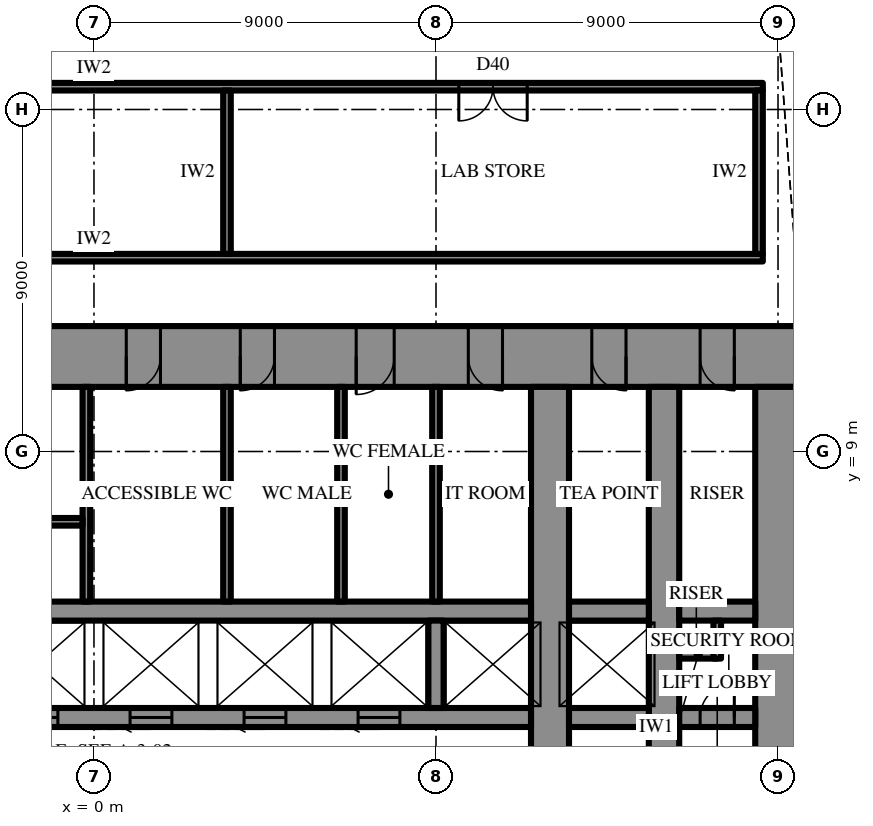
"""IFC4 building model, lengths in metres.
Left out: names, types, materials, properties, quantities, classifications, styles, units other than length and angle.
Written with IfcOpenShell. Run it as: python <this file> out.ifc"""

import sys

from ifc_helpers import new_model, si_unit, direction, frame, frame_2d, origin, place, context, subcontext, project, spatial, rectangle, extrude, element, fill, save


model = new_model("IFC4")
c1 = context("Model", 3, precision=1e-05, world=origin(), true_north=direction((0.0, 1.0)))
c2 = subcontext(c1, "Body", "Model", "MODEL_VIEW")
j1 = project(units=[si_unit("LENGTHUNIT", "METRE"), si_unit("PLANEANGLEUNIT", "RADIAN")], contexts=[c1])
p1 = place(None, origin())
s1 = spatial("IfcSite", under=j1, at=p1, CompositionType="ELEMENT")
p2 = place(p1, origin())
s2 = spatial("IfcBuilding", under=s1, at=p2, CompositionType="ELEMENT")
p3 = place(p2, frame((0.0, 0.0, 199.3)))
s3 = spatial("IfcBuildingStorey", under=s2, at=p3, CompositionType="ELEMENT", Elevation=199.3)
p4 = place(p3, frame((-18.6, 11.5, 0.0), z_axis=(0.0, 0.0, 1.0), x_axis=(1.0, 0.0, 0.0)))
e1 = element("IfcWall", 1, at=p4, inside=s3, PredefinedType="SHEAR", context=c2, shape_type="SweptSolid", body=[
    extrude(rectangle(XDim=37.2, YDim=1.6, at=frame_2d((18.6, 0.0))), origin(), (0.0, 0.0, 1.0), 4.2),
])
p5 = place(p4, frame((19.45, 0.0, 0.0)))
e2 = element("IfcOpeningElement", 2, at=p5, cuts=e1, PredefinedType="OPENING", context=c2, shape_type="SweptSolid", body=[
    extrude(rectangle(XDim=0.9, YDim=2.2, at=frame_2d((0.45, 1.1))), frame((0.0, 0.81, 0.0), z_axis=(0.0, -1.0, 0.0), x_axis=(1.0, 0.0, 0.0)), (0.0, 0.0, 1.0), 1.62),
])
p6 = place(p4, frame((22.45, 0.0, 0.0)))
e3 = element("IfcOpeningElement", 3, at=p6, cuts=e1, PredefinedType="OPENING", context=c2, shape_type="SweptSolid", body=[
    extrude(rectangle(XDim=0.9, YDim=2.2, at=frame_2d((0.45, 1.1))), frame((0.0, 0.81, 0.0), z_axis=(0.0, -1.0, 0.0), x_axis=(1.0, 0.0, 0.0)), (0.0, 0.0, 1.0), 1.62),
])
p7 = place(p4, frame((25.5, 0.0, 0.0)))
e4 = element("IfcOpeningElement", 4, at=p7, cuts=e1, PredefinedType="OPENING", context=c2, shape_type="SweptSolid", body=[
    extrude(rectangle(XDim=1.0, YDim=2.2, at=frame_2d((0.5, 1.1))), frame((0.0, 0.81, 0.0), z_axis=(0.0, -1.0, 0.0), x_axis=(1.0, 0.0, 0.0)), (0.0, 0.0, 1.0), 1.62),
])
p8 = place(p4, frame((1.75, 0.0, 0.0)))
e5 = element("IfcOpeningElement", 5, at=p8, cuts=e1, PredefinedType="OPENING", context=c2, shape_type="SweptSolid", body=[
    extrude(rectangle(XDim=0.9, YDim=2.2, at=frame_2d((0.45, 1.1))), frame((0.0, 0.81, 0.0), z_axis=(0.0, -1.0, 0.0), x_axis=(1.0, 0.0, 0.0)), (0.0, 0.0, 1.0), 1.62),
])
p9 = place(p4, frame((4.6, 0.0, 0.0)))
e6 = element("IfcOpeningElement", 6, at=p9, cuts=e1, PredefinedType="OPENING", context=c2, shape_type="SweptSolid", body=[
    extrude(rectangle(XDim=0.9, YDim=2.2, at=frame_2d((0.45, 1.1))), frame((0.0, 0.81, 0.0), z_axis=(0.0, -1.0, 0.0), x_axis=(1.0, 0.0, 0.0)), (0.0, 0.0, 1.0), 1.62),
])
p10 = place(p4, frame((7.85, 0.0, 0.0)))
e7 = element("IfcOpeningElement", 7, at=p10, cuts=e1, PredefinedType="OPENING", context=c2, shape_type="SweptSolid", body=[
    extrude(rectangle(XDim=0.9, YDim=2.2, at=frame_2d((0.45, 1.1))), frame((0.0, 0.81, 0.0), z_axis=(0.0, -1.0, 0.0), x_axis=(1.0, 0.0, 0.0)), (0.0, 0.0, 1.0), 1.62),
])
p11 = place(p4, frame((28.45, 0.0, 0.0)))
e8 = element("IfcOpeningElement", 8, at=p11, cuts=e1, PredefinedType="OPENING", context=c2, shape_type="SweptSolid", body=[
    extrude(rectangle(XDim=0.9, YDim=2.2, at=frame_2d((0.45, 1.1))), frame((0.0, 0.81, 0.0), z_axis=(0.0, -1.0, 0.0), x_axis=(1.0, 0.0, 0.0)), (0.0, 0.0, 1.0), 1.62),
])
p12 = place(p4, frame((31.7, 0.0, 0.0)))
e9 = element("IfcOpeningElement", 9, at=p12, cuts=e1, PredefinedType="OPENING", context=c2, shape_type="SweptSolid", body=[
    extrude(rectangle(XDim=0.9, YDim=2.2, at=frame_2d((0.45, 1.1))), frame((0.0, 0.81, 0.0), z_axis=(0.0, -1.0, 0.0), x_axis=(1.0, 0.0, 0.0)), (0.0, 0.0, 1.0), 1.62),
])
p13 = place(p4, frame((34.55, 0.0, 0.0)))
e10 = element("IfcOpeningElement", 10, at=p13, cuts=e1, PredefinedType="OPENING", context=c2, shape_type="SweptSolid", body=[
    extrude(rectangle(XDim=0.9, YDim=2.2, at=frame_2d((0.45, 1.1))), frame((0.0, 0.81, 0.0), z_axis=(0.0, -1.0, 0.0), x_axis=(1.0, 0.0, 0.0)), (0.0, 0.0, 1.0), 1.62),
])
p14 = place(p3, frame((18.0, -10.7, 0.0), z_axis=(0.0, 0.0, 1.0), x_axis=(0.0, 1.0, 0.0)))
e11 = element("IfcWall", 11, at=p14, inside=s3, PredefinedType="SHEAR", context=c2, shape_type="SweptSolid", body=[
    extrude(rectangle(XDim=21.4, YDim=1.2, at=frame_2d((10.7, 0.0))), origin(), (0.0, 0.0, 1.0), 4.2),
])
p15 = place(p14, frame((9.8, 0.0, 0.0)))
e12 = element("IfcOpeningElement", 12, at=p15, cuts=e11, PredefinedType="OPENING", context=c2, shape_type="SweptSolid", body=[
    extrude(rectangle(XDim=1.8, YDim=2.4, at=frame_2d((0.9, 1.2))), frame((0.0, 0.61, 0.0), z_axis=(0.0, -1.0, 0.0), x_axis=(1.0, 0.0, 0.0)), (0.0, 0.0, 1.0), 1.22),
])
p16 = place(p3, frame((12.0, -10.7, 0.0), z_axis=(0.0, 0.0, 1.0), x_axis=(0.0, 1.0, 0.0)))
e13 = element("IfcWall", 13, at=p16, inside=s3, PredefinedType="SHEAR", context=c2, shape_type="SweptSolid", body=[
    extrude(rectangle(XDim=21.4, YDim=1.0, at=frame_2d((10.7, 0.0))), origin(), (0.0, 0.0, 1.0), 4.2),
])
p17 = place(p16, frame((9.8, 0.0, 0.0)))
e14 = element("IfcOpeningElement", 14, at=p17, cuts=e13, PredefinedType="OPENING", context=c2, shape_type="SweptSolid", body=[
    extrude(rectangle(XDim=1.8, YDim=2.4, at=frame_2d((0.9, 1.2))), frame((0.0, 0.51, 0.0), z_axis=(0.0, -1.0, 0.0), x_axis=(1.0, 0.0, 0.0)), (0.0, 0.0, 1.0), 1.02),
])
p18 = place(p3, frame((15.0, -10.7, 0.0), z_axis=(0.0, 0.0, 1.0), x_axis=(0.0, 1.0, 0.0)))
e15 = element("IfcWall", 15, at=p18, inside=s3, PredefinedType="SHEAR", context=c2, shape_type="SweptSolid", body=[
    extrude(rectangle(XDim=21.4, YDim=0.8, at=frame_2d((10.7, 0.0))), origin(), (0.0, 0.0, 1.0), 4.2),
])
p19 = place(p18, frame((9.8, 0.0, 0.0)))
e16 = element("IfcOpeningElement", 16, at=p19, cuts=e15, PredefinedType="OPENING", context=c2, shape_type="SweptSolid", body=[
    extrude(rectangle(XDim=1.8, YDim=2.4, at=frame_2d((0.9, 1.2))), frame((0.0, 0.41, 0.0), z_axis=(0.0, -1.0, 0.0), x_axis=(1.0, 0.0, 0.0)), (0.0, 0.0, 1.0), 0.82),
])
p20 = place(p3, frame((-3.2, 2.0, 0.0), z_axis=(0.0, 0.0, 1.0), x_axis=(1.0, 0.0, 0.0)))
e17 = element("IfcWall", 17, at=p20, inside=s3, PredefinedType="SHEAR", context=c2, shape_type="SweptSolid", body=[
    extrude(rectangle(XDim=14.7, YDim=0.5, at=frame_2d((7.35, 0.0))), origin(), (0.0, 0.0, 1.0), 4.2),
])
p21 = place(p20, frame((1.15, 0.0, 0.0)))
e18 = element("IfcOpeningElement", 18, at=p21, cuts=e17, PredefinedType="OPENING", context=c2, shape_type="SweptSolid", body=[
    extrude(rectangle(XDim=1.1, YDim=2.2, at=frame_2d((0.55, 1.1))), frame((0.0, 0.26, 0.0), z_axis=(0.0, -1.0, 0.0), x_axis=(1.0, 0.0, 0.0)), (0.0, 0.0, 1.0), 0.52),
])
p22 = place(p20, frame((4.15, 0.0, 0.0)))
e19 = element("IfcOpeningElement", 19, at=p22, cuts=e17, PredefinedType="OPENING", context=c2, shape_type="SweptSolid", body=[
    extrude(rectangle(XDim=1.1, YDim=2.2, at=frame_2d((0.55, 1.1))), frame((0.0, 0.26, 0.0), z_axis=(0.0, -1.0, 0.0), x_axis=(1.0, 0.0, 0.0)), (0.0, 0.0, 1.0), 0.52),
])
p23 = place(p20, frame((7.15, 0.0, 0.0)))
e20 = element("IfcOpeningElement", 20, at=p23, cuts=e17, PredefinedType="OPENING", context=c2, shape_type="SweptSolid", body=[
    extrude(rectangle(XDim=1.1, YDim=2.2, at=frame_2d((0.55, 1.1))), frame((0.0, 0.26, 0.0), z_axis=(0.0, -1.0, 0.0), x_axis=(1.0, 0.0, 0.0)), (0.0, 0.0, 1.0), 0.52),
])
p24 = place(p20, frame((10.15, 0.0, 0.0)))
e21 = element("IfcOpeningElement", 21, at=p24, cuts=e17, PredefinedType="OPENING", context=c2, shape_type="SweptSolid", body=[
    extrude(rectangle(XDim=1.1, YDim=2.2, at=frame_2d((0.55, 1.1))), frame((0.0, 0.26, 0.0), z_axis=(0.0, -1.0, 0.0), x_axis=(1.0, 0.0, 0.0)), (0.0, 0.0, 1.0), 0.52),
])
p25 = place(p3, frame((12.5, 2.0, 0.0), z_axis=(0.0, 0.0, 1.0), x_axis=(1.0, 0.0, 0.0)))
e22 = element("IfcWall", 22, at=p25, inside=s3, PredefinedType="SHEAR", context=c2, shape_type="SweptSolid", body=[
    extrude(rectangle(XDim=2.1, YDim=0.5, at=frame_2d((1.05, 0.0))), origin(), (0.0, 0.0, 1.0), 4.2),
])
p26 = place(p3, frame((15.4, 2.0, 0.0), z_axis=(0.0, 0.0, 1.0), x_axis=(1.0, 0.0, 0.0)))
e23 = element("IfcWall", 23, at=p26, inside=s3, PredefinedType="SHEAR", context=c2, shape_type="SweptSolid", body=[
    extrude(rectangle(XDim=2.0, YDim=0.5, at=frame_2d((1.0, 0.0))), origin(), (0.0, 0.0, 1.0), 4.2),
])
p27 = place(p26, frame((0.55, 0.0, 0.0)))
e24 = element("IfcOpeningElement", 24, at=p27, cuts=e23, PredefinedType="OPENING", context=c2, shape_type="SweptSolid", body=[
    extrude(rectangle(XDim=0.9, YDim=2.2, at=frame_2d((0.45, 1.1))), frame((0.0, 0.26, 0.0), z_axis=(0.0, -1.0, 0.0), x_axis=(1.0, 0.0, 0.0)), (0.0, 0.0, 1.0), 0.52),
])
p28 = place(p3, frame((-11.5, 4.8, 0.0), z_axis=(0.0, 0.0, 1.0), x_axis=(1.0, 0.0, 0.0)))
e25 = element("IfcWall", 25, at=p28, inside=s3, PredefinedType="SHEAR", context=c2, shape_type="SweptSolid", body=[
    extrude(rectangle(XDim=23.0, YDim=0.5, at=frame_2d((11.5, 0.0))), origin(), (0.0, 0.0, 1.0), 4.2),
])
p29 = place(p28, frame((6.4, 0.0, 0.0)))
e26 = element("IfcOpeningElement", 26, at=p29, cuts=e25, PredefinedType="OPENING", context=c2, shape_type="SweptSolid", body=[
    extrude(rectangle(XDim=1.2, YDim=2.2, at=frame_2d((0.6, 1.1))), frame((0.0, 0.26, 0.0), z_axis=(0.0, -1.0, 0.0), x_axis=(1.0, 0.0, 0.0)), (0.0, 0.0, 1.0), 0.52),
])
p30 = place(p28, frame((3.4, 0.0, 0.0)))
e27 = element("IfcOpeningElement", 27, at=p30, cuts=e25, PredefinedType="OPENING", context=c2, shape_type="SweptSolid", body=[
    extrude(rectangle(XDim=1.2, YDim=2.2, at=frame_2d((0.6, 1.1))), frame((0.0, 0.26, 0.0), z_axis=(0.0, -1.0, 0.0), x_axis=(1.0, 0.0, 0.0)), (0.0, 0.0, 1.0), 0.52),
])
p31 = place(p3, frame((12.5, 4.8, 0.0), z_axis=(0.0, 0.0, 1.0), x_axis=(1.0, 0.0, 0.0)))
e28 = element("IfcWall", 28, at=p31, inside=s3, PredefinedType="SHEAR", context=c2, shape_type="SweptSolid", body=[
    extrude(rectangle(XDim=2.1, YDim=0.5, at=frame_2d((1.05, 0.0))), origin(), (0.0, 0.0, 1.0), 4.2),
])
p32 = place(p3, frame((15.4, 4.8, 0.0), z_axis=(0.0, 0.0, 1.0), x_axis=(1.0, 0.0, 0.0)))
e29 = element("IfcWall", 29, at=p32, inside=s3, PredefinedType="SHEAR", context=c2, shape_type="SweptSolid", body=[
    extrude(rectangle(XDim=2.0, YDim=0.5, at=frame_2d((1.0, 0.0))), origin(), (0.0, 0.0, 1.0), 4.2),
])
p33 = place(p3, frame((9.0, 2.25, 0.0), z_axis=(0.0, 0.0, 1.0), x_axis=(0.0, 1.0, 0.0)))
e30 = element("IfcWall", 30, at=p33, inside=s3, PredefinedType="SHEAR", context=c2, shape_type="SweptSolid", body=[
    extrude(rectangle(XDim=2.3, YDim=0.4, at=frame_2d((1.15, 0.0))), origin(), (0.0, 0.0, 1.0), 4.2),
])
p34 = place(p3, frame((-0.2, 5.05, 0.0), z_axis=(0.0, 0.0, 1.0), x_axis=(0.0, 1.0, 0.0)))
e31 = element("IfcWall", 31, at=p34, inside=s3, PredefinedType="SHEAR", context=c2, shape_type="SweptSolid", body=[
    extrude(rectangle(XDim=5.65, YDim=0.2, at=frame_2d((2.825, 0.0))), origin(), (0.0, 0.0, 1.0), 4.2),
])
p35 = place(p3, frame((-8.9, 7.15, 0.0), z_axis=(0.0, 0.0, 1.0), x_axis=(1.0, 0.0, 0.0)))
e32 = element("IfcWall", 32, at=p35, inside=s3, PredefinedType="SHEAR", context=c2, shape_type="SweptSolid", body=[
    extrude(rectangle(XDim=8.6, YDim=0.2, at=frame_2d((4.3, 0.0))), origin(), (0.0, 0.0, 1.0), 4.2),
])
p36 = place(p35, frame((0.3, 0.0, 0.0)))
e33 = element("IfcOpeningElement", 33, at=p36, cuts=e32, PredefinedType="OPENING", context=c2, shape_type="SweptSolid", body=[
    extrude(rectangle(XDim=1.0, YDim=2.2, at=frame_2d((0.5, 1.1))), frame((0.0, 0.11, 0.0), z_axis=(0.0, -1.0, 0.0), x_axis=(1.0, 0.0, 0.0)), (0.0, 0.0, 1.0), 0.22),
])
for number, where, z_axis, x_axis in (
    (34, (9.0, 5.05, 0.0), (0.0, 0.0, 1.0), (0.0, 1.0, 0.0)),
    (35, (3.5, 5.05, 0.0), (0.0, 0.0, 1.0), (0.0, 1.0, 0.0)),
    (36, (6.5, 5.05, 0.0), (0.0, 0.0, 1.0), (0.0, 1.0, 0.0)),
):
    element("IfcWall", number, at=place(p3, frame(where, z_axis=z_axis, x_axis=x_axis)), inside=s3, PredefinedType="PARTITIONING", context=c2, shape_type="SweptSolid", body=[
        extrude(rectangle(XDim=5.65, YDim=0.2, at=frame_2d((2.825, 0.0))), origin(), (0.0, 0.0, 1.0), 3.9),
    ])
for number, where, z_axis, x_axis in (
    (37, (15.4, 3.65, 0.0), (0.0, 0.0, 1.0), (1.0, 0.0, 0.0)),
    (38, (16.4, 3.55, 0.0), (0.0, 0.0, 1.0), (0.0, 1.0, 0.0)),
):
    element("IfcWall", number, at=place(p3, frame(where, z_axis=z_axis, x_axis=x_axis)), inside=s3, PredefinedType="PARTITIONING", context=c2, shape_type="SweptSolid", body=[
        extrude(rectangle(XDim=1.0, YDim=0.2, at=frame_2d((0.5, 0.0))), origin(), (0.0, 0.0, 1.0), 3.9),
    ])
p37 = place(p3, frame((-17.6, 14.1, 0.0), z_axis=(0.0, 0.0, 1.0), x_axis=(1.0, 0.0, 0.0)))
e39 = element("IfcWall", 39, at=p37, inside=s3, PredefinedType="PARTITIONING", context=c2, shape_type="SweptSolid", body=[
    extrude(rectangle(XDim=35.2, YDim=0.2, at=frame_2d((17.6, 0.0))), origin(), (0.0, 0.0, 1.0), 3.9),
])
p38 = place(p3, frame((-17.6, 18.6, 0.0), z_axis=(0.0, 0.0, 1.0), x_axis=(1.0, 0.0, 0.0)))
e40 = element("IfcWall", 40, at=p38, inside=s3, PredefinedType="PARTITIONING", context=c2, shape_type="SweptSolid", body=[
    extrude(rectangle(XDim=35.2, YDim=0.2, at=frame_2d((17.6, 0.0))), origin(), (0.0, 0.0, 1.0), 3.9),
])
p39 = place(p38, frame((9.7, 0.0, 0.0)))
e41 = element("IfcOpeningElement", 41, at=p39, cuts=e40, PredefinedType="OPENING", context=c2, shape_type="SweptSolid", body=[
    extrude(rectangle(XDim=1.8, YDim=2.4, at=frame_2d((0.9, 1.2))), frame((0.0, 0.11, 0.0), z_axis=(0.0, -1.0, 0.0), x_axis=(1.0, 0.0, 0.0)), (0.0, 0.0, 1.0), 0.22),
])
p40 = place(p38, frame((27.2, 0.0, 0.0)))
e42 = element("IfcOpeningElement", 42, at=p40, cuts=e40, PredefinedType="OPENING", context=c2, shape_type="SweptSolid", body=[
    extrude(rectangle(XDim=1.8, YDim=2.4, at=frame_2d((0.9, 1.2))), frame((0.0, 0.11, 0.0), z_axis=(0.0, -1.0, 0.0), x_axis=(1.0, 0.0, 0.0)), (0.0, 0.0, 1.0), 0.22),
])
for number, where, z_axis, x_axis in (
    (43, (3.5, 14.2, 0.0), (0.0, 0.0, 1.0), (0.0, 1.0, 0.0)),
    (44, (17.5, 14.2, 0.0), (0.0, 0.0, 1.0), (0.0, 1.0, 0.0)),
):
    element("IfcWall", number, at=place(p3, frame(where, z_axis=z_axis, x_axis=x_axis)), inside=s3, PredefinedType="PARTITIONING", context=c2, shape_type="SweptSolid", body=[
        extrude(rectangle(XDim=4.3, YDim=0.2, at=frame_2d((2.15, 0.0))), origin(), (0.0, 0.0, 1.0), 3.9),
    ])
p41 = place(p3, frame((28.436, 4.747, 0.0), z_axis=(0.0, 0.0, 1.0), x_axis=(-0.499995666571, 0.866027905677, 0.0)))
e45 = element("IfcWall", 45, at=p41, inside=s3, PredefinedType="PARTITIONING", context=c2, shape_type="SweptSolid", body=[
    extrude(rectangle(XDim=20.215, YDim=0.2, at=frame_2d((10.107, 0.0))), origin(), (0.0, 0.0, 1.0), 3.9),
])
p42 = place(p41, frame((2.102, 0.0, 0.0)))
e46 = element("IfcOpeningElement", 46, at=p42, cuts=e45, PredefinedType="OPENING", context=c2, shape_type="SweptSolid", body=[
    extrude(rectangle(XDim=1.0, YDim=2.2, at=frame_2d((0.5, 1.1))), frame((0.0, 0.11, 0.0), z_axis=(0.0, -1.0, 0.0), x_axis=(1.0, 0.0, 0.0)), (0.0, 0.0, 1.0), 0.22),
])
p43 = place(p41, frame((7.105, 0.0, 0.0)))
e47 = element("IfcOpeningElement", 47, at=p43, cuts=e45, PredefinedType="OPENING", context=c2, shape_type="SweptSolid", body=[
    extrude(rectangle(XDim=1.0, YDim=2.2, at=frame_2d((0.5, 1.1))), frame((0.0, 0.11, 0.0), z_axis=(0.0, -1.0, 0.0), x_axis=(1.0, 0.0, 0.0)), (0.0, 0.0, 1.0), 0.22),
])
p44 = place(p41, frame((12.109, 0.0, 0.0)))
e48 = element("IfcOpeningElement", 48, at=p44, cuts=e45, PredefinedType="OPENING", context=c2, shape_type="SweptSolid", body=[
    extrude(rectangle(XDim=1.0, YDim=2.2, at=frame_2d((0.5, 1.1))), frame((0.0, 0.11, 0.0), z_axis=(0.0, -1.0, 0.0), x_axis=(1.0, 0.0, 0.0)), (0.0, 0.0, 1.0), 0.22),
])
p45 = place(p41, frame((17.113, 0.0, 0.0)))
e49 = element("IfcOpeningElement", 49, at=p45, cuts=e45, PredefinedType="OPENING", context=c2, shape_type="SweptSolid", body=[
    extrude(rectangle(XDim=1.0, YDim=2.2, at=frame_2d((0.5, 1.1))), frame((0.0, 0.11, 0.0), z_axis=(0.0, -1.0, 0.0), x_axis=(1.0, 0.0, 0.0)), (0.0, 0.0, 1.0), 0.22),
])
p46 = place(p5, frame((0.9, 0.0, 0.0), z_axis=(0.0, 0.0, 1.0), x_axis=(-1.0, 0.0, 0.0)))
e50 = element("IfcDoor", 50, at=p46, inside=s3, OperationType="SINGLE_SWING_LEFT", PredefinedType="DOOR", context=c2, shape_type="SweptSolid", body=[
    extrude(rectangle(XDim=0.9, YDim=2.2, at=frame_2d((0.45, 1.1))), frame((0.0, 0.025, 0.0), z_axis=(0.0, -1.0, 0.0), x_axis=(1.0, 0.0, 0.0)), (0.0, 0.0, 1.0), 0.05),
])
fill(e2, e50)
p47 = place(p6, frame((0.9, 0.0, 0.0), z_axis=(0.0, 0.0, 1.0), x_axis=(-1.0, 0.0, 0.0)))
e51 = element("IfcDoor", 51, at=p47, inside=s3, OperationType="SINGLE_SWING_LEFT", PredefinedType="DOOR", context=c2, shape_type="SweptSolid", body=[
    extrude(rectangle(XDim=0.9, YDim=2.2, at=frame_2d((0.45, 1.1))), frame((0.0, 0.025, 0.0), z_axis=(0.0, -1.0, 0.0), x_axis=(1.0, 0.0, 0.0)), (0.0, 0.0, 1.0), 0.05),
])
fill(e3, e51)
p48 = place(p7, frame((1.0, 0.0, 0.0), z_axis=(0.0, 0.0, 1.0), x_axis=(-1.0, 0.0, 0.0)))
e52 = element("IfcDoor", 52, at=p48, inside=s3, OperationType="SINGLE_SWING_LEFT", PredefinedType="DOOR", context=c2, shape_type="SweptSolid", body=[
    extrude(rectangle(XDim=1.0, YDim=2.2, at=frame_2d((0.5, 1.1))), frame((0.0, 0.025, 0.0), z_axis=(0.0, -1.0, 0.0), x_axis=(1.0, 0.0, 0.0)), (0.0, 0.0, 1.0), 0.05),
])
fill(e4, e52)
p49 = place(p11, frame((0.9, 0.0, 0.0), z_axis=(0.0, 0.0, 1.0), x_axis=(-1.0, 0.0, 0.0)))
e53 = element("IfcDoor", 53, at=p49, inside=s3, OperationType="SINGLE_SWING_RIGHT", PredefinedType="DOOR", context=c2, shape_type="SweptSolid", body=[
    extrude(rectangle(XDim=0.9, YDim=2.2, at=frame_2d((0.45, 1.1))), frame((0.0, 0.025, 0.0), z_axis=(0.0, -1.0, 0.0), x_axis=(1.0, 0.0, 0.0)), (0.0, 0.0, 1.0), 0.05),
])
fill(e8, e53)
p50 = place(p12, frame((0.9, 0.0, 0.0), z_axis=(0.0, 0.0, 1.0), x_axis=(-1.0, 0.0, 0.0)))
e54 = element("IfcDoor", 54, at=p50, inside=s3, OperationType="SINGLE_SWING_RIGHT", PredefinedType="DOOR", context=c2, shape_type="SweptSolid", body=[
    extrude(rectangle(XDim=0.9, YDim=2.2, at=frame_2d((0.45, 1.1))), frame((0.0, 0.025, 0.0), z_axis=(0.0, -1.0, 0.0), x_axis=(1.0, 0.0, 0.0)), (0.0, 0.0, 1.0), 0.05),
])
fill(e9, e54)
p51 = place(p13, frame((0.9, 0.0, 0.0), z_axis=(0.0, 0.0, 1.0), x_axis=(-1.0, 0.0, 0.0)))
e55 = element("IfcDoor", 55, at=p51, inside=s3, OperationType="SINGLE_SWING_RIGHT", PredefinedType="DOOR", context=c2, shape_type="SweptSolid", body=[
    extrude(rectangle(XDim=0.9, YDim=2.2, at=frame_2d((0.45, 1.1))), frame((0.0, 0.025, 0.0), z_axis=(0.0, -1.0, 0.0), x_axis=(1.0, 0.0, 0.0)), (0.0, 0.0, 1.0), 0.05),
])
fill(e10, e55)
p52 = place(p27, origin())
e56 = element("IfcDoor", 56, at=p52, inside=s3, OperationType="SINGLE_SWING_LEFT", PredefinedType="DOOR", context=c2, shape_type="SweptSolid", body=[
    extrude(rectangle(XDim=0.9, YDim=2.2, at=frame_2d((0.45, 1.1))), frame((0.0, 0.025, 0.0), z_axis=(0.0, -1.0, 0.0), x_axis=(1.0, 0.0, 0.0)), (0.0, 0.0, 1.0), 0.05),
])
fill(e24, e56)
p53 = place(p21, frame((1.1, 0.0, 0.0), z_axis=(0.0, 0.0, 1.0), x_axis=(-1.0, 0.0, 0.0)))
e57 = element("IfcDoor", 57, at=p53, inside=s3, OperationType="SLIDING_TO_LEFT", PredefinedType="DOOR", context=c2, shape_type="SweptSolid", body=[
    extrude(rectangle(XDim=1.1, YDim=2.2, at=frame_2d((0.55, 1.1))), frame((0.0, 0.025, 0.0), z_axis=(0.0, -1.0, 0.0), x_axis=(1.0, 0.0, 0.0)), (0.0, 0.0, 1.0), 0.05),
])
fill(e18, e57)
p54 = place(p22, frame((1.1, 0.0, 0.0), z_axis=(0.0, 0.0, 1.0), x_axis=(-1.0, 0.0, 0.0)))
e58 = element("IfcDoor", 58, at=p54, inside=s3, OperationType="SLIDING_TO_LEFT", PredefinedType="DOOR", context=c2, shape_type="SweptSolid", body=[
    extrude(rectangle(XDim=1.1, YDim=2.2, at=frame_2d((0.55, 1.1))), frame((0.0, 0.025, 0.0), z_axis=(0.0, -1.0, 0.0), x_axis=(1.0, 0.0, 0.0)), (0.0, 0.0, 1.0), 0.05),
])
fill(e19, e58)
p55 = place(p23, frame((1.1, 0.0, 0.0), z_axis=(0.0, 0.0, 1.0), x_axis=(-1.0, 0.0, 0.0)))
e59 = element("IfcDoor", 59, at=p55, inside=s3, OperationType="SLIDING_TO_LEFT", PredefinedType="DOOR", context=c2, shape_type="SweptSolid", body=[
    extrude(rectangle(XDim=1.1, YDim=2.2, at=frame_2d((0.55, 1.1))), frame((0.0, 0.025, 0.0), z_axis=(0.0, -1.0, 0.0), x_axis=(1.0, 0.0, 0.0)), (0.0, 0.0, 1.0), 0.05),
])
fill(e20, e59)
p56 = place(p24, frame((1.1, 0.0, 0.0), z_axis=(0.0, 0.0, 1.0), x_axis=(-1.0, 0.0, 0.0)))
e60 = element("IfcDoor", 60, at=p56, inside=s3, OperationType="SLIDING_TO_LEFT", PredefinedType="DOOR", context=c2, shape_type="SweptSolid", body=[
    extrude(rectangle(XDim=1.1, YDim=2.2, at=frame_2d((0.55, 1.1))), frame((0.0, 0.025, 0.0), z_axis=(0.0, -1.0, 0.0), x_axis=(1.0, 0.0, 0.0)), (0.0, 0.0, 1.0), 0.05),
])
fill(e21, e60)
p57 = place(p40, frame((1.8, 0.0, 0.0), z_axis=(0.0, 0.0, 1.0), x_axis=(-1.0, 0.0, 0.0)))
e61 = element("IfcDoor", 61, at=p57, inside=s3, OperationType="DOUBLE_DOOR_SINGLE_SWING", PredefinedType="DOOR", context=c2, shape_type="SweptSolid", body=[
    extrude(rectangle(XDim=1.8, YDim=2.4, at=frame_2d((0.9, 1.2))), frame((0.0, 0.025, 0.0), z_axis=(0.0, -1.0, 0.0), x_axis=(1.0, 0.0, 0.0)), (0.0, 0.0, 1.0), 0.05),
])
fill(e42, e61)
save(model, sys.argv[1])
